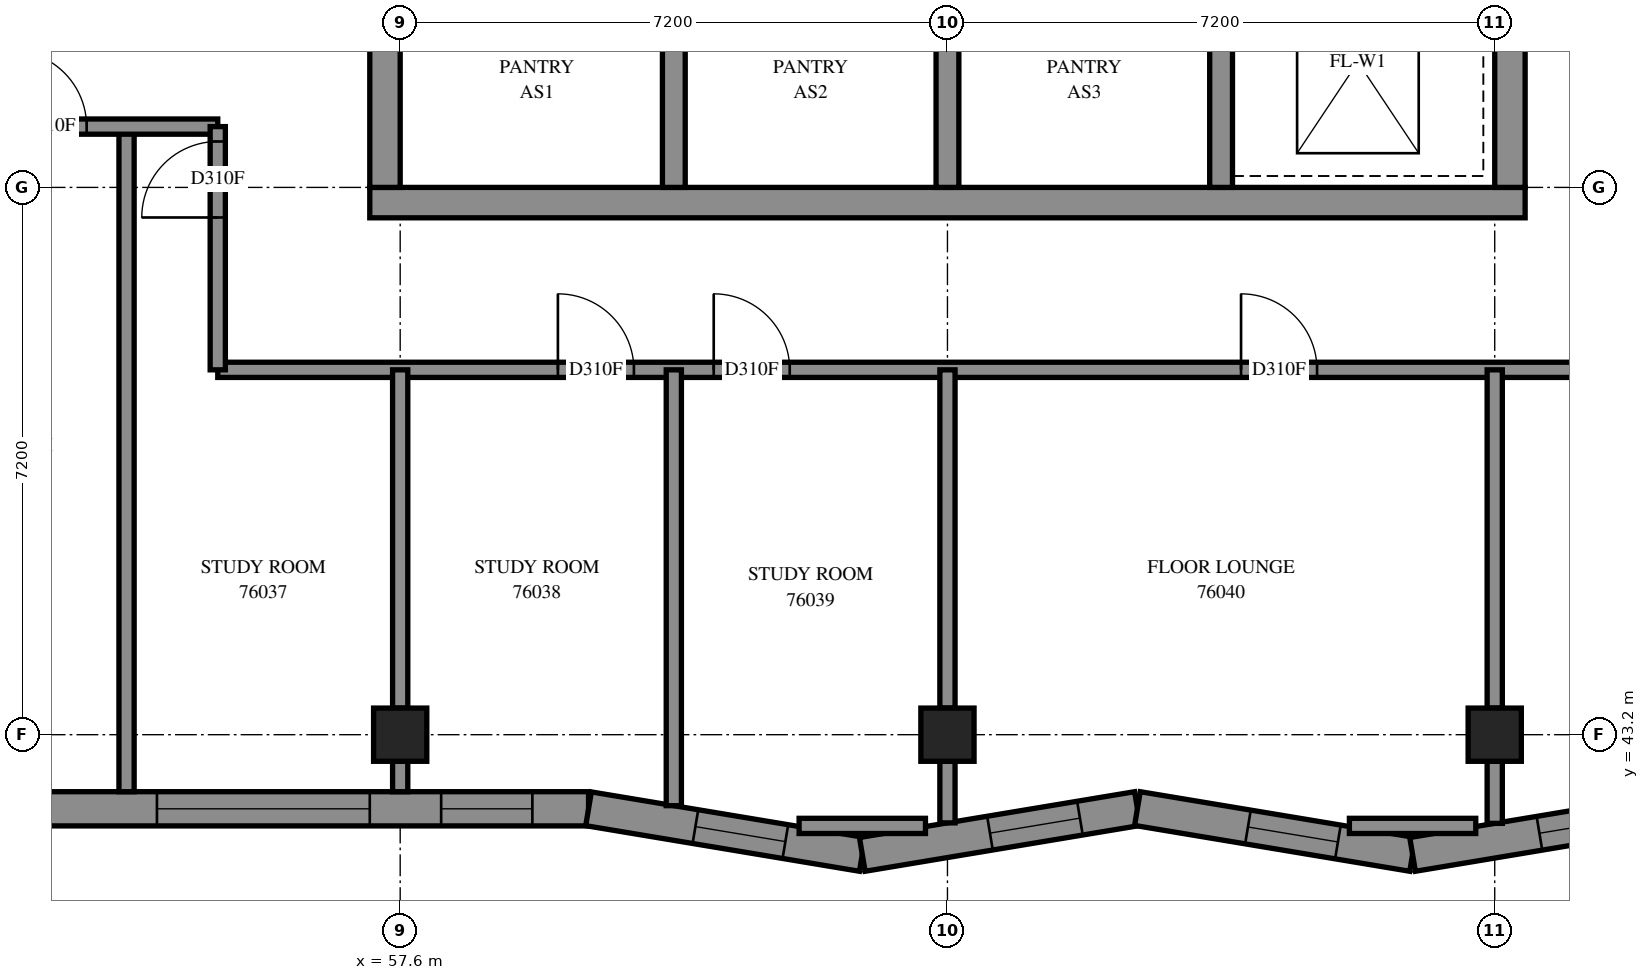
"""IFC4 building model, lengths in metres.
Left out: names, types, materials, properties, quantities, classifications, styles, units other than length and angle.
Written with IfcOpenShell. Run it as: python <this file> out.ifc"""

import sys

from ifc_helpers import new_model, si_unit, direction, frame, frame_2d, origin, origin_2d, place, context, subcontext, project, spatial, polyline, rectangle, outline, extrude, element, fill, save


model = new_model("IFC4")
c1 = context("Model", 3, precision=1e-05, world=origin(), true_north=direction((0.0, 1.0)))
c2 = subcontext(c1, "Body", "Model", "MODEL_VIEW")
j1 = project(units=[si_unit("LENGTHUNIT", "METRE"), si_unit("PLANEANGLEUNIT", "RADIAN")], contexts=[c1])
p1 = place(None, origin())
s1 = spatial("IfcSite", under=j1, at=p1, CompositionType="ELEMENT")
p2 = place(p1, origin())
s2 = spatial("IfcBuilding", under=s1, at=p2, CompositionType="ELEMENT")
p3 = place(p2, frame((0.0, 0.0, 277.8)))
s3 = spatial("IfcBuildingStorey", under=s2, at=p3, CompositionType="ELEMENT", Elevation=277.8)
for number, where, z_axis, x_axis in (
    (1, (57.6, 43.2, 0.0), (0.0, 0.0, 1.0), (1.0, 0.0, 0.0)),
    (2, (64.8, 43.2, 0.0), (0.0, 0.0, 1.0), (1.0, 0.0, 0.0)),
    (3, (72.0, 43.2, 0.0), (0.0, 0.0, 1.0), (1.0, 0.0, 0.0)),
):
    element("IfcColumn", number, at=place(p3, frame(where, z_axis=z_axis, x_axis=x_axis)), inside=s3, PredefinedType="COLUMN", context=c2, shape_type="SweptSolid", body=[
        extrude(rectangle(XDim=0.7, YDim=0.7, at=origin_2d()), origin(), (0.0, 0.0, 1.0), 3.1),
    ])
p4 = place(p3, frame((57.2, 50.2, -0.3), z_axis=(0.0, 0.0, 1.0), x_axis=(1.0, 0.0, 0.0)))
e4 = element("IfcWall", 4, at=p4, inside=s3, PredefinedType="SHEAR", context=c2, shape_type="SweptSolid", body=[
    extrude(rectangle(XDim=15.2, YDim=0.4, at=frame_2d((7.6, 0.0))), origin(), (0.0, 0.0, 1.0), 2.7),
])
p5 = place(p3, frame((57.4, 50.4, -0.3), z_axis=(0.0, 0.0, 1.0), x_axis=(0.0, 1.0, 0.0)))
e5 = element("IfcWall", 5, at=p5, inside=s3, PredefinedType="SHEAR", context=c2, shape_type="SweptSolid", body=[
    extrude(rectangle(XDim=14.4, YDim=0.4, at=frame_2d((7.2, 0.0))), origin(), (0.0, 0.0, 1.0), 2.7),
])
p6 = place(p5, frame((4.55, 0.0, 0.3)))
e6 = element("IfcOpeningElement", 6, at=p6, cuts=e5, PredefinedType="OPENING", context=c2, shape_type="SweptSolid", body=[
    extrude(rectangle(XDim=1.1, YDim=2.1, at=frame_2d((0.55, 1.05))), frame((0.0, 0.21, 0.0), z_axis=(0.0, -1.0, 0.0), x_axis=(1.0, 0.0, 0.0)), (0.0, 0.0, 1.0), 0.42),
])
p7 = place(p5, frame((11.35, 0.0, 0.3)))
e7 = element("IfcOpeningElement", 7, at=p7, cuts=e5, PredefinedType="OPENING", context=c2, shape_type="SweptSolid", body=[
    extrude(rectangle(XDim=1.1, YDim=2.1, at=frame_2d((0.55, 1.05))), frame((0.0, 0.21, 0.0), z_axis=(0.0, -1.0, 0.0), x_axis=(1.0, 0.0, 0.0)), (0.0, 0.0, 1.0), 0.42),
])
p8 = place(p3, frame((72.2, 50.4, -0.3), z_axis=(0.0, 0.0, 1.0), x_axis=(0.0, 1.0, 0.0)))
e8 = element("IfcWall", 8, at=p8, inside=s3, PredefinedType="SHEAR", context=c2, shape_type="SweptSolid", body=[
    extrude(rectangle(XDim=14.4, YDim=0.4, at=frame_2d((7.2, 0.0))), origin(), (0.0, 0.0, 1.0), 2.7),
])
p9 = place(p8, frame((4.55, 0.0, 0.3)))
e9 = element("IfcOpeningElement", 9, at=p9, cuts=e8, PredefinedType="OPENING", context=c2, shape_type="SweptSolid", body=[
    extrude(rectangle(XDim=1.1, YDim=2.1, at=frame_2d((0.55, 1.05))), frame((0.0, 0.21, 0.0), z_axis=(0.0, -1.0, 0.0), x_axis=(1.0, 0.0, 0.0)), (0.0, 0.0, 1.0), 0.42),
])
p10 = place(p8, frame((11.35, 0.0, 0.3)))
e10 = element("IfcOpeningElement", 10, at=p10, cuts=e8, PredefinedType="OPENING", context=c2, shape_type="SweptSolid", body=[
    extrude(rectangle(XDim=1.1, YDim=2.1, at=frame_2d((0.55, 1.05))), frame((0.0, 0.21, 0.0), z_axis=(0.0, -1.0, 0.0), x_axis=(1.0, 0.0, 0.0)), (0.0, 0.0, 1.0), 0.42),
])
for number, where, z_axis, x_axis in (
    (11, (61.2, 50.4, 0.0), (0.0, 0.0, 1.0), (0.0, 1.0, 0.0)),
    (12, (64.8, 50.4, 0.0), (0.0, 0.0, 1.0), (0.0, 1.0, 0.0)),
    (13, (68.4, 50.4, 0.0), (0.0, 0.0, 1.0), (0.0, 1.0, 0.0)),
):
    element("IfcWall", number, at=place(p3, frame(where, z_axis=z_axis, x_axis=x_axis)), inside=s3, PredefinedType="SOLIDWALL", context=c2, shape_type="SweptSolid", body=[
        extrude(rectangle(XDim=3.3, YDim=0.3, at=frame_2d((1.65, 0.0))), origin(), (0.0, 0.0, 1.0), 3.1),
    ])
p11 = place(p3, frame((52.783, 42.225, 0.0), z_axis=(0.0, 0.0, 1.0), x_axis=(1.0, 0.0, 0.0)))
e14 = element("IfcWall", 14, at=p11, inside=s3, PredefinedType="SOLIDWALL", context=c2, shape_type="SweptSolid", body=[
    extrude(outline(polyline([(0.036, -0.225), (7.276, -0.225), (7.313, 0.225), (-0.036, 0.225), (0.036, -0.225)])), origin(), (0.0, 0.0, 1.0), 3.1),
])
p12 = place(p11, frame((1.617, 0.0, 0.45)))
e15 = element("IfcOpeningElement", 15, at=p12, cuts=e14, PredefinedType="OPENING", context=c2, shape_type="SweptSolid", body=[
    extrude(rectangle(XDim=2.8, YDim=2.55, at=frame_2d((1.4, 1.275))), frame((0.0, 0.235, 0.0), z_axis=(0.0, -1.0, 0.0), x_axis=(1.0, 0.0, 0.0)), (0.0, 0.0, 1.0), 0.47),
])
p13 = place(p11, frame((5.356, 0.0, 0.45)))
e16 = element("IfcOpeningElement", 16, at=p13, cuts=e14, PredefinedType="OPENING", context=c2, shape_type="SweptSolid", body=[
    extrude(rectangle(XDim=1.2, YDim=2.55, at=frame_2d((0.6, 1.275))), frame((0.0, 0.235, 0.0), z_axis=(0.0, -1.0, 0.0), x_axis=(1.0, 0.0, 0.0)), (0.0, 0.0, 1.0), 0.47),
])
p14 = place(p3, frame((60.078, 42.225, 0.0), z_axis=(0.0, 0.0, 1.0), x_axis=(0.9864079855, -0.1643145949, 0.0)))
e17 = element("IfcWall", 17, at=p14, inside=s3, PredefinedType="SOLIDWALL", context=c2, shape_type="SweptSolid", body=[
    extrude(outline(polyline([(0.019, -0.225), (3.688, -0.225), (3.613, 0.225), (-0.019, 0.225), (0.019, -0.225)])), origin(), (0.0, 0.0, 1.0), 3.1),
])
p15 = place(p14, frame((1.425, 0.0, 0.45)))
e18 = element("IfcOpeningElement", 18, at=p15, cuts=e17, PredefinedType="OPENING", context=c2, shape_type="SweptSolid", body=[
    extrude(rectangle(XDim=1.2, YDim=2.55, at=frame_2d((0.6, 1.275))), frame((0.0, 0.235, 0.0), z_axis=(0.0, -1.0, 0.0), x_axis=(1.0, 0.0, 0.0)), (0.0, 0.0, 1.0), 0.47),
])
p16 = place(p3, frame((63.679, 41.625, 0.0), z_axis=(0.0, 0.0, 1.0), x_axis=(0.9864071775, 0.1643194453, 0.0)))
e19 = element("IfcWall", 19, at=p16, inside=s3, PredefinedType="SOLIDWALL", context=c2, shape_type="SweptSolid", body=[
    extrude(outline(polyline([(-0.037, -0.225), (3.632, -0.225), (3.707, 0.225), (0.037, 0.225), (-0.037, -0.225)])), origin(), (0.0, 0.0, 1.0), 3.1),
])
p17 = place(p16, frame((1.703, 0.0, 0.45)))
e20 = element("IfcOpeningElement", 20, at=p17, cuts=e19, PredefinedType="OPENING", context=c2, shape_type="SweptSolid", body=[
    extrude(rectangle(XDim=1.2, YDim=2.55, at=frame_2d((0.6, 1.275))), frame((0.0, 0.235, 0.0), z_axis=(0.0, -1.0, 0.0), x_axis=(1.0, 0.0, 0.0)), (0.0, 0.0, 1.0), 0.47),
])
p18 = place(p3, frame((67.299, 42.228, 0.0), z_axis=(0.0, 0.0, 1.0), x_axis=(0.9864079133, -0.1643150285, 0.0)))
e21 = element("IfcWall", 21, at=p18, inside=s3, PredefinedType="SOLIDWALL", context=c2, shape_type="SweptSolid", body=[
    extrude(outline(polyline([(0.037, -0.225), (3.707, -0.225), (3.632, 0.225), (-0.037, 0.225), (0.037, -0.225)])), origin(), (0.0, 0.0, 1.0), 3.1),
])
p19 = place(p18, frame((1.474, 0.0, 0.45)))
e22 = element("IfcOpeningElement", 22, at=p19, cuts=e21, PredefinedType="OPENING", context=c2, shape_type="SweptSolid", body=[
    extrude(rectangle(XDim=1.2, YDim=2.55, at=frame_2d((0.6, 1.275))), frame((0.0, 0.235, 0.0), z_axis=(0.0, -1.0, 0.0), x_axis=(1.0, 0.0, 0.0)), (0.0, 0.0, 1.0), 0.47),
])
p20 = place(p3, frame((70.919, 41.625, 0.0), z_axis=(0.0, 0.0, 1.0), x_axis=(0.9864078441, 0.1643154439, 0.0)))
e23 = element("IfcWall", 23, at=p20, inside=s3, PredefinedType="SOLIDWALL", context=c2, shape_type="SweptSolid", body=[
    extrude(outline(polyline([(-0.037, -0.225), (3.632, -0.225), (3.744, 0.225), (0.037, 0.225), (-0.037, -0.225)])), origin(), (0.0, 0.0, 1.0), 3.1),
])
p21 = place(p20, frame((1.692, 0.0, 0.45)))
e24 = element("IfcOpeningElement", 24, at=p21, cuts=e23, PredefinedType="OPENING", context=c2, shape_type="SweptSolid", body=[
    extrude(rectangle(XDim=1.2, YDim=2.55, at=frame_2d((0.6, 1.275))), frame((0.0, 0.235, 0.0), z_axis=(0.0, -1.0, 0.0), x_axis=(1.0, 0.0, 0.0)), (0.0, 0.0, 1.0), 0.47),
])
p22 = place(p3, frame((55.2, 48.0, 0.0), z_axis=(0.0, 0.0, 1.0), x_axis=(1.0, 0.0, 0.0)))
e25 = element("IfcWall", 25, at=p22, inside=s3, PredefinedType="PARTITIONING", context=c2, shape_type="SweptSolid", body=[
    extrude(rectangle(XDim=19.15, YDim=0.2, at=frame_2d((9.575, 0.0))), origin(), (0.0, 0.0, 1.0), 3.1),
])
p23 = place(p22, frame((4.475, 0.0, 0.0)))
e26 = element("IfcOpeningElement", 26, at=p23, cuts=e25, PredefinedType="OPENING", context=c2, shape_type="SweptSolid", body=[
    extrude(rectangle(XDim=1.0, YDim=2.1, at=frame_2d((0.5, 1.05))), frame((0.0, 0.11, 0.0), z_axis=(0.0, -1.0, 0.0), x_axis=(1.0, 0.0, 0.0)), (0.0, 0.0, 1.0), 0.22),
])
p24 = place(p22, frame((6.525, 0.0, 0.0)))
e27 = element("IfcOpeningElement", 27, at=p24, cuts=e25, PredefinedType="OPENING", context=c2, shape_type="SweptSolid", body=[
    extrude(rectangle(XDim=1.0, YDim=2.1, at=frame_2d((0.5, 1.05))), frame((0.0, 0.11, 0.0), z_axis=(0.0, -1.0, 0.0), x_axis=(1.0, 0.0, 0.0)), (0.0, 0.0, 1.0), 0.22),
])
p25 = place(p22, frame((13.463, 0.0, 0.0)))
e28 = element("IfcOpeningElement", 28, at=p25, cuts=e25, PredefinedType="OPENING", context=c2, shape_type="SweptSolid", body=[
    extrude(rectangle(XDim=1.0, YDim=2.1, at=frame_2d((0.5, 1.05))), frame((0.0, 0.11, 0.0), z_axis=(0.0, -1.0, 0.0), x_axis=(1.0, 0.0, 0.0)), (0.0, 0.0, 1.0), 0.22),
])
p26 = place(p3, frame((54.0, 42.45, 0.0), z_axis=(0.0, 0.0, 1.0), x_axis=(0.0, 1.0, 0.0)))
e29 = element("IfcWall", 29, at=p26, inside=s3, PredefinedType="PARTITIONING", context=c2, shape_type="SweptSolid", body=[
    extrude(rectangle(XDim=8.75, YDim=0.2, at=frame_2d((4.375, 0.0))), origin(), (0.0, 0.0, 1.0), 3.1),
])
p27 = place(p3, frame((61.2, 42.266, 0.0), z_axis=(0.0, 0.0, 1.0), x_axis=(0.0, 1.0, 0.0)))
e30 = element("IfcWall", 30, at=p27, inside=s3, PredefinedType="PARTITIONING", context=c2, shape_type="SweptSolid", body=[
    extrude(rectangle(XDim=5.734, YDim=0.2, at=frame_2d((2.867, 0.0))), origin(), (0.0, 0.0, 1.0), 3.1),
])
p28 = place(p3, frame((50.4, 51.2, 0.0), z_axis=(0.0, 0.0, 1.0), x_axis=(1.0, 0.0, 0.0)))
e31 = element("IfcWall", 31, at=p28, inside=s3, PredefinedType="PARTITIONING", context=c2, shape_type="SweptSolid", body=[
    extrude(rectangle(XDim=4.8, YDim=0.2, at=frame_2d((2.4, 0.0))), origin(), (0.0, 0.0, 1.0), 3.1),
])
p29 = place(p28, frame((2.075, 0.0, 0.0)))
e32 = element("IfcOpeningElement", 32, at=p29, cuts=e31, PredefinedType="OPENING", context=c2, shape_type="SweptSolid", body=[
    extrude(rectangle(XDim=1.0, YDim=2.1, at=frame_2d((0.5, 1.05))), frame((0.0, 0.11, 0.0), z_axis=(0.0, -1.0, 0.0), x_axis=(1.0, 0.0, 0.0)), (0.0, 0.0, 1.0), 0.22),
])
for number, where, z_axis, x_axis in (
    (33, (57.6, 43.55, 0.0), (0.0, 0.0, 1.0), (0.0, 1.0, 0.0)),
    (34, (64.8, 43.55, 0.0), (0.0, 0.0, 1.0), (0.0, 1.0, 0.0)),
    (35, (72.0, 43.55, 0.0), (0.0, 0.0, 1.0), (0.0, 1.0, 0.0)),
):
    element("IfcWall", number, at=place(p3, frame(where, z_axis=z_axis, x_axis=x_axis)), inside=s3, PredefinedType="PARTITIONING", context=c2, shape_type="SweptSolid", body=[
        extrude(rectangle(XDim=4.45, YDim=0.2, at=frame_2d((2.225, 0.0))), origin(), (0.0, 0.0, 1.0), 3.1),
    ])
p30 = place(p3, frame((55.2, 48.0, 0.0), z_axis=(0.0, 0.0, 1.0), x_axis=(0.0, 1.0, 0.0)))
e36 = element("IfcWall", 36, at=p30, inside=s3, PredefinedType="PARTITIONING", context=c2, shape_type="SweptSolid", body=[
    extrude(rectangle(XDim=3.2, YDim=0.2, at=frame_2d((1.6, 0.0))), origin(), (0.0, 0.0, 1.0), 3.1),
])
p31 = place(p30, frame((2.004, 0.0, 0.0)))
e37 = element("IfcOpeningElement", 37, at=p31, cuts=e36, PredefinedType="OPENING", context=c2, shape_type="SweptSolid", body=[
    extrude(rectangle(XDim=1.0, YDim=2.1, at=frame_2d((0.5, 1.05))), frame((0.0, 0.11, 0.0), z_axis=(0.0, -1.0, 0.0), x_axis=(1.0, 0.0, 0.0)), (0.0, 0.0, 1.0), 0.22),
])
for number, where, z_axis, x_axis in (
    (38, (70.088, 42.0, 0.0), (0.0, 0.0, 1.0), (1.0, 0.0, 0.0)),
    (39, (62.848, 42.0, 0.0), (0.0, 0.0, 1.0), (1.0, 0.0, 0.0)),
):
    element("IfcWall", number, at=place(p3, frame(where, z_axis=z_axis, x_axis=x_axis)), inside=s3, PredefinedType="PARTITIONING", context=c2, shape_type="SweptSolid", body=[
        extrude(rectangle(XDim=1.663, YDim=0.2, at=frame_2d((0.831, 0.0))), origin(), (0.0, 0.0, 1.0), 3.1),
    ])
p32 = place(p3, frame((72.0, 42.033, 0.0), z_axis=(0.0, 0.0, 1.0), x_axis=(0.0, 1.0, 0.0)))
e40 = element("IfcWall", 40, at=p32, inside=s3, PredefinedType="PARTITIONING", context=c2, shape_type="SweptSolid", body=[
    extrude(rectangle(XDim=0.817, YDim=0.2, at=frame_2d((0.408, 0.0))), origin(), (0.0, 0.0, 1.0), 3.1),
])
p33 = place(p3, frame((64.8, 42.04, 0.0), z_axis=(0.0, 0.0, 1.0), x_axis=(0.0, 1.0, 0.0)))
e41 = element("IfcWall", 41, at=p33, inside=s3, PredefinedType="PARTITIONING", context=c2, shape_type="SweptSolid", body=[
    extrude(rectangle(XDim=0.81, YDim=0.2, at=frame_2d((0.405, 0.0))), origin(), (0.0, 0.0, 1.0), 3.1),
])
p34 = place(p3, frame((57.6, 42.45, 0.0), z_axis=(0.0, 0.0, 1.0), x_axis=(0.0, 1.0, 0.0)))
e42 = element("IfcWall", 42, at=p34, inside=s3, PredefinedType="PARTITIONING", context=c2, shape_type="SweptSolid", body=[
    extrude(rectangle(XDim=0.4, YDim=0.2, at=frame_2d((0.2, 0.0))), origin(), (0.0, 0.0, 1.0), 3.1),
])
p35 = place(p12, origin())
e43 = element("IfcWindow", 43, at=p35, inside=s3, PartitioningType="SINGLE_PANEL", PredefinedType="WINDOW", context=c2, shape_type="SweptSolid", body=[
    extrude(rectangle(XDim=2.8, YDim=2.55, at=frame_2d((1.4, 1.275))), frame((0.0, 0.205, 0.0), z_axis=(0.0, -1.0, 0.0), x_axis=(1.0, 0.0, 0.0)), (0.0, 0.0, 1.0), 0.06),
])
fill(e15, e43)
p36 = place(p13, origin())
e44 = element("IfcWindow", 44, at=p36, inside=s3, PartitioningType="SINGLE_PANEL", PredefinedType="WINDOW", context=c2, shape_type="SweptSolid", body=[
    extrude(rectangle(XDim=1.2, YDim=2.55, at=frame_2d((0.6, 1.275))), frame((0.0, 0.205, 0.0), z_axis=(0.0, -1.0, 0.0), x_axis=(1.0, 0.0, 0.0)), (0.0, 0.0, 1.0), 0.06),
])
fill(e16, e44)
p37 = place(p15, origin())
e45 = element("IfcWindow", 45, at=p37, inside=s3, PartitioningType="SINGLE_PANEL", PredefinedType="WINDOW", context=c2, shape_type="SweptSolid", body=[
    extrude(rectangle(XDim=1.2, YDim=2.55, at=frame_2d((0.6, 1.275))), frame((0.0, 0.205, 0.0), z_axis=(0.0, -1.0, 0.0), x_axis=(1.0, 0.0, 0.0)), (0.0, 0.0, 1.0), 0.06),
])
fill(e18, e45)
p38 = place(p17, origin())
e46 = element("IfcWindow", 46, at=p38, inside=s3, PartitioningType="SINGLE_PANEL", PredefinedType="WINDOW", context=c2, shape_type="SweptSolid", body=[
    extrude(rectangle(XDim=1.2, YDim=2.55, at=frame_2d((0.6, 1.275))), frame((0.0, 0.205, 0.0), z_axis=(0.0, -1.0, 0.0), x_axis=(1.0, 0.0, 0.0)), (0.0, 0.0, 1.0), 0.06),
])
fill(e20, e46)
p39 = place(p19, origin())
e47 = element("IfcWindow", 47, at=p39, inside=s3, PartitioningType="SINGLE_PANEL", PredefinedType="WINDOW", context=c2, shape_type="SweptSolid", body=[
    extrude(rectangle(XDim=1.2, YDim=2.55, at=frame_2d((0.6, 1.275))), frame((0.0, 0.205, 0.0), z_axis=(0.0, -1.0, 0.0), x_axis=(1.0, 0.0, 0.0)), (0.0, 0.0, 1.0), 0.06),
])
fill(e22, e47)
p40 = place(p21, origin())
e48 = element("IfcWindow", 48, at=p40, inside=s3, PartitioningType="SINGLE_PANEL", PredefinedType="WINDOW", context=c2, shape_type="SweptSolid", body=[
    extrude(rectangle(XDim=1.2, YDim=2.55, at=frame_2d((0.6, 1.275))), frame((0.0, 0.205, 0.0), z_axis=(0.0, -1.0, 0.0), x_axis=(1.0, 0.0, 0.0)), (0.0, 0.0, 1.0), 0.06),
])
fill(e24, e48)
p41 = place(p29, origin())
e49 = element("IfcDoor", 49, at=p41, inside=s3, OperationType="SINGLE_SWING_LEFT", PredefinedType="DOOR", context=c2, shape_type="SweptSolid", body=[
    extrude(rectangle(XDim=1.0, YDim=2.1, at=frame_2d((0.5, 1.05))), frame((0.0, 0.025, 0.0), z_axis=(0.0, -1.0, 0.0), x_axis=(1.0, 0.0, 0.0)), (0.0, 0.0, 1.0), 0.05),
])
fill(e32, e49)
p42 = place(p31, origin())
e50 = element("IfcDoor", 50, at=p42, inside=s3, OperationType="SINGLE_SWING_RIGHT", PredefinedType="DOOR", context=c2, shape_type="SweptSolid", body=[
    extrude(rectangle(XDim=1.0, YDim=2.1, at=frame_2d((0.5, 1.05))), frame((0.0, 0.025, 0.0), z_axis=(0.0, -1.0, 0.0), x_axis=(1.0, 0.0, 0.0)), (0.0, 0.0, 1.0), 0.05),
])
fill(e37, e50)
p43 = place(p23, origin())
e51 = element("IfcDoor", 51, at=p43, inside=s3, OperationType="SINGLE_SWING_LEFT", PredefinedType="DOOR", context=c2, shape_type="SweptSolid", body=[
    extrude(rectangle(XDim=1.0, YDim=2.1, at=frame_2d((0.5, 1.05))), frame((0.0, 0.025, 0.0), z_axis=(0.0, -1.0, 0.0), x_axis=(1.0, 0.0, 0.0)), (0.0, 0.0, 1.0), 0.05),
])
fill(e26, e51)
p44 = place(p24, origin())
e52 = element("IfcDoor", 52, at=p44, inside=s3, OperationType="SINGLE_SWING_RIGHT", PredefinedType="DOOR", context=c2, shape_type="SweptSolid", body=[
    extrude(rectangle(XDim=1.0, YDim=2.1, at=frame_2d((0.5, 1.05))), frame((0.0, 0.025, 0.0), z_axis=(0.0, -1.0, 0.0), x_axis=(1.0, 0.0, 0.0)), (0.0, 0.0, 1.0), 0.05),
])
fill(e27, e52)
p45 = place(p25, origin())
e53 = element("IfcDoor", 53, at=p45, inside=s3, OperationType="SINGLE_SWING_LEFT", PredefinedType="DOOR", context=c2, shape_type="SweptSolid", body=[
    extrude(rectangle(XDim=1.0, YDim=2.1, at=frame_2d((0.5, 1.05))), frame((0.0, 0.025, 0.0), z_axis=(0.0, -1.0, 0.0), x_axis=(1.0, 0.0, 0.0)), (0.0, 0.0, 1.0), 0.05),
])
fill(e28, e53)
save(model, sys.argv[1])
